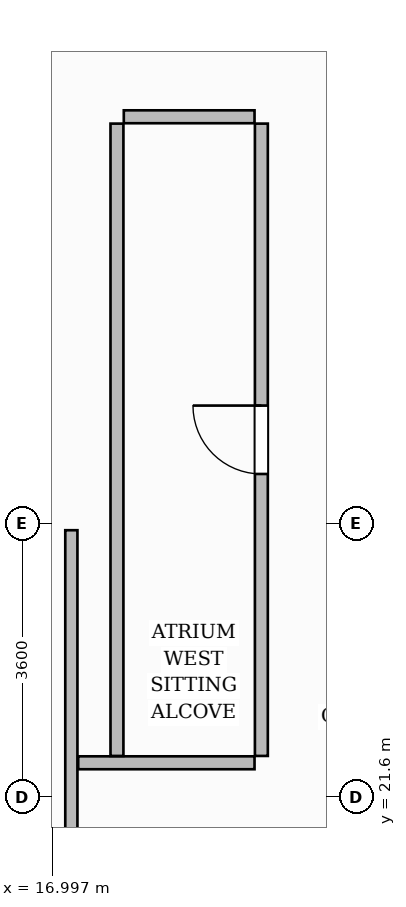
"""IFC4 building model, lengths in metres.
Left out: names, types, materials, properties, quantities, classifications, styles, units other than length and angle.
Written with IfcOpenShell. Run it as: python <this file> out.ifc"""

import sys

from ifc_helpers import new_model, si_unit, direction, frame, frame_2d, origin, place, context, subcontext, project, spatial, rectangle, extrude, source, transform, mapped, element, fill, save


model = new_model("IFC4")
c1 = context("Model", 3, precision=1e-05, world=origin(), true_north=direction((0.0, 1.0)))
c2 = subcontext(c1, "Body", "Model", "MODEL_VIEW")
j1 = project(units=[si_unit("LENGTHUNIT", "METRE"), si_unit("PLANEANGLEUNIT", "RADIAN")], contexts=[c1])
p1 = place(None, origin())
s1 = spatial("IfcSite", under=j1, at=p1, CompositionType="ELEMENT")
p2 = place(p1, origin())
s2 = spatial("IfcBuilding", under=s1, at=p2, CompositionType="ELEMENT")
p3 = place(p2, frame((0.0, 0.0, 73.1)))
s3 = spatial("IfcBuildingStorey", under=s2, at=p3, CompositionType="ELEMENT", Elevation=73.1)
p4 = place(p3, frame((17.25, 11.36, 0.0), z_axis=(0.0, 0.0, 1.0), x_axis=(0.0, 1.0, 0.0)))
e1 = element("IfcWall", 1, at=p4, inside=s3, PredefinedType="PARTITIONING", context=c2, shape_type="SweptSolid", body=[
    extrude(rectangle(XDim=13.75, YDim=0.16, at=frame_2d((6.875, 0.0))), origin(), (0.0, 0.0, 1.0), 3.45),
])
p5 = place(p3, frame((17.34, 22.05, 0.0), z_axis=(0.0, 0.0, 1.0), x_axis=(1.0, 0.0, 0.0)))
e2 = element("IfcWall", 2, at=p5, inside=s3, PredefinedType="PARTITIONING", context=c2, shape_type="SweptSolid", body=[
    extrude(rectangle(XDim=2.32, YDim=0.17, at=frame_2d((1.16, 0.0))), origin(), (0.0, 0.0, 1.0), 3.45),
])
p6 = place(p3, frame((17.94, 30.55, 0.0), z_axis=(0.0, 0.0, 1.0), x_axis=(1.0, 0.0, 0.0)))
e3 = element("IfcWall", 3, at=p6, inside=s3, PredefinedType="PARTITIONING", context=c2, shape_type="SweptSolid", body=[
    extrude(rectangle(XDim=1.72, YDim=0.17, at=frame_2d((0.86, 0.0))), origin(), (0.0, 0.0, 1.0), 3.45),
])
p7 = place(p3, frame((17.85, 22.14, 0.0), z_axis=(0.0, 0.0, 1.0), x_axis=(0.0, 1.0, 0.0)))
e4 = element("IfcWall", 4, at=p7, inside=s3, PredefinedType="PARTITIONING", context=c2, shape_type="SweptSolid", body=[
    extrude(rectangle(XDim=8.32, YDim=0.17, at=frame_2d((4.16, 0.0))), origin(), (0.0, 0.0, 1.0), 3.45),
])
p8 = place(p3, frame((19.75, 22.14, 0.0), z_axis=(0.0, 0.0, 1.0), x_axis=(0.0, 1.0, 0.0)))
e5 = element("IfcWall", 5, at=p8, inside=s3, PredefinedType="PARTITIONING", context=c2, shape_type="SweptSolid", body=[
    extrude(rectangle(XDim=8.32, YDim=0.17, at=frame_2d((4.16, 0.0))), origin(), (0.0, 0.0, 1.0), 3.45),
])
p9 = place(p8, frame((3.71, 0.0, 0.0)))
e6 = element("IfcOpeningElement", 6, at=p9, cuts=e5, PredefinedType="OPENING", context=c2, shape_type="SweptSolid", body=[
    extrude(rectangle(XDim=0.9, YDim=2.15, at=frame_2d((0.45, 1.075))), frame((0.0, 0.095, 0.0), z_axis=(0.0, -1.0, 0.0), x_axis=(1.0, 0.0, 0.0)), (0.0, 0.0, 1.0), 0.19),
])
m1 = source(origin(), c2, "Body", "SweptSolid", [
    extrude(rectangle(XDim=0.9, YDim=2.15, at=frame_2d((0.45, 1.075))), frame((0.0, 0.025, 0.0), z_axis=(0.0, -1.0, 0.0), x_axis=(1.0, 0.0, 0.0)), (0.0, 0.0, 1.0), 0.05),
])
p10 = place(p9, origin())
e7 = element("IfcDoor", 7, at=p10, inside=s3, OperationType="SINGLE_SWING_RIGHT", PredefinedType="DOOR", context=c2, shape_type="MappedRepresentation", body=[
    mapped(m1, transform((0.0, 0.0, 0.0), scale=1.0)),
])
fill(e6, e7)
save(model, sys.argv[1])
